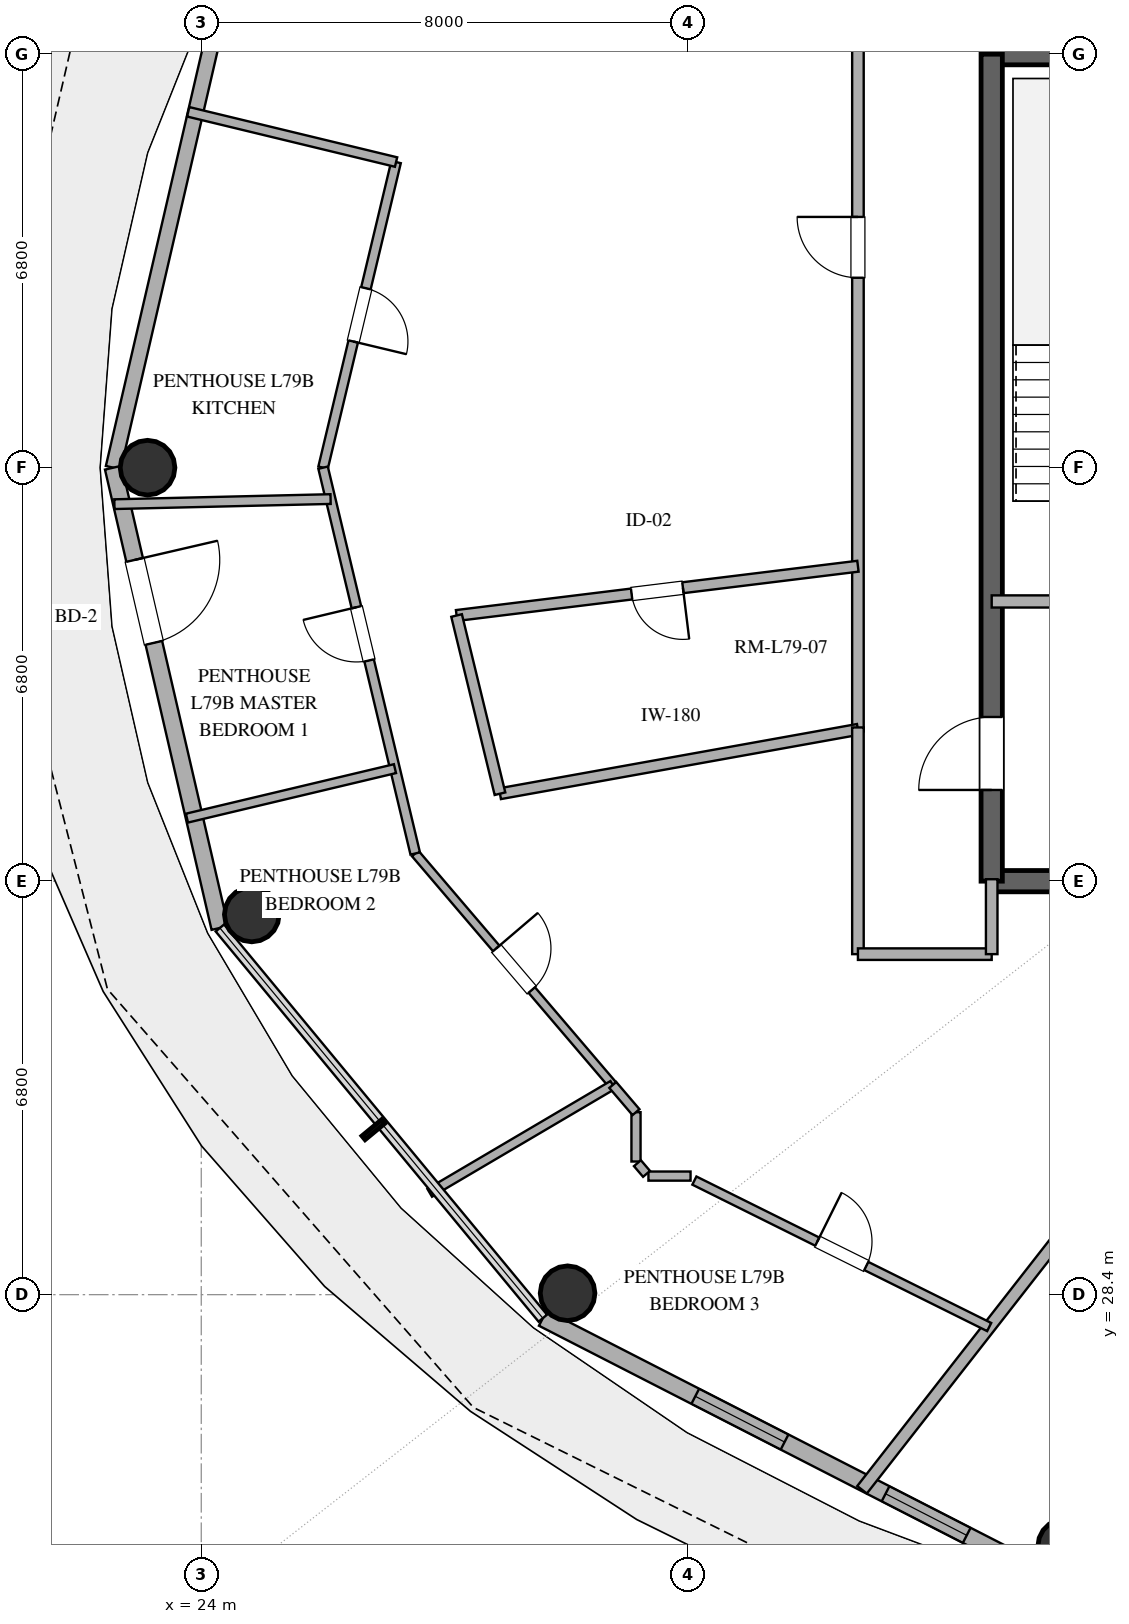
"""IFC4 building model, lengths in metres.
Left out: names, types, materials, properties, quantities, classifications, styles, units other than length and angle.
Written with IfcOpenShell. Run it as: python <this file> out.ifc"""

import sys

from ifc_helpers import new_model, si_unit, direction, frame, frame_2d, origin, origin_2d, place, context, subcontext, project, spatial, rectangle, hollow_circle, extrude, element, fill, save


model = new_model("IFC4")
c1 = context("Model", 3, precision=1e-05, world=origin(), true_north=direction((0.0, 1.0)))
c2 = subcontext(c1, "Body", "Model", "MODEL_VIEW")
j1 = project(units=[si_unit("LENGTHUNIT", "METRE"), si_unit("PLANEANGLEUNIT", "RADIAN")], contexts=[c1])
p1 = place(None, origin())
s1 = spatial("IfcSite", under=j1, at=p1, CompositionType="ELEMENT")
p2 = place(p1, origin())
s2 = spatial("IfcBuilding", under=s1, at=p2, CompositionType="ELEMENT")
p3 = place(p2, frame((0.0, 0.0, 305.4)))
s3 = spatial("IfcBuildingStorey", under=s2, at=p3, CompositionType="ELEMENT", Elevation=305.4)
for number, where, z_axis, x_axis in (
    (1, (37.0, 35.2, 0.0), (0.0, 0.0, 1.0), (1.0, 0.0, 0.0)),
    (2, (37.0, 48.8, 0.0), (0.0, 0.0, 1.0), (1.0, 0.0, 0.0)),
):
    element("IfcWall", number, at=place(p3, frame(where, z_axis=z_axis, x_axis=x_axis)), inside=s3, PredefinedType="SHEAR", context=c2, shape_type="SweptSolid", body=[
        extrude(rectangle(XDim=4.0, YDim=0.35, at=frame_2d((2.0, 0.0))), origin(), (0.0, 0.0, 1.0), 3.37),
    ])
p4 = place(p3, frame((37.0, 35.2, 0.0), z_axis=(0.0, 0.0, 1.0), x_axis=(0.0, 1.0, 0.0)))
e3 = element("IfcWall", 3, at=p4, inside=s3, PredefinedType="SHEAR", context=c2, shape_type="SweptSolid", body=[
    extrude(rectangle(XDim=13.6, YDim=0.35, at=frame_2d((6.8, 0.0))), origin(), (0.0, 0.0, 1.0), 3.37),
])
p5 = place(p4, frame((1.5, 0.0, 0.0)))
e4 = element("IfcOpeningElement", 4, at=p5, cuts=e3, PredefinedType="OPENING", context=c2, shape_type="SweptSolid", body=[
    extrude(rectangle(XDim=1.2, YDim=2.15, at=frame_2d((0.6, 1.075))), frame((0.0, 0.185, 0.0), z_axis=(0.0, -1.0, 0.0), x_axis=(1.0, 0.0, 0.0)), (0.0, 0.0, 1.0), 0.37),
])
for number, where, z_axis, x_axis in (
    (5, (23.117, 42.0, 0.0), (0.0, 0.0, 1.0), (1.0, 0.0, 0.0)),
    (6, (24.831, 34.653, 0.0), (0.0, 0.0, 1.0), (1.0, 0.0, 0.0)),
    (7, (30.025, 28.424, 0.0), (0.0, 0.0, 1.0), (1.0, 0.0, 0.0)),
    (8, (38.209, 24.261, 0.0), (0.0, 0.0, 1.0), (1.0, 0.0, 0.0)),
):
    element("IfcColumn", number, at=place(p3, frame(where, z_axis=z_axis, x_axis=x_axis)), inside=s3, PredefinedType="COLUMN", context=c2, shape_type="SweptSolid", body=[
        extrude(hollow_circle(Radius=0.45, WallThickness=0.025, at=origin_2d()), origin(), (0.0, 0.0, 1.0), 3.37),
    ])
p6 = place(p3, frame((24.306, 49.57, 0.0), z_axis=(0.0, 0.0, 1.0), x_axis=(-0.225635078214, -0.974211892495, 0.0)))
e9 = element("IfcWall", 9, at=p6, inside=s3, PredefinedType="SOLIDWALL", context=c2, shape_type="SweptSolid", body=[
    extrude(rectangle(XDim=7.77, YDim=0.25, at=frame_2d((3.885, 0.0))), origin(), (0.0, 0.0, 1.0), 3.37),
])
p7 = place(p3, frame((22.553, 42.0, 0.0), z_axis=(0.0, 0.0, 1.0), x_axis=(0.225635078214, -0.974211892495, 0.0)))
e10 = element("IfcWall", 10, at=p7, inside=s3, PredefinedType="SOLIDWALL", context=c2, shape_type="SweptSolid", body=[
    extrude(rectangle(XDim=7.77, YDim=0.28, at=frame_2d((3.885, 0.0))), origin(), (0.0, 0.0, 1.0), 3.37),
])
p8 = place(p7, frame((1.557, 0.0, 0.0)))
e11 = element("IfcOpeningElement", 11, at=p8, cuts=e10, PredefinedType="OPENING", context=c2, shape_type="SweptSolid", body=[
    extrude(rectangle(XDim=1.4, YDim=2.2, at=frame_2d((0.7, 1.1))), frame((0.0, 0.15, 0.0), z_axis=(0.0, -1.0, 0.0), x_axis=(1.0, 0.0, 0.0)), (0.0, 0.0, 1.0), 0.3),
])
p9 = place(p3, frame((29.617, 28.013, 0.0), z_axis=(0.0, 0.0, 1.0), x_axis=(0.890007394051, -0.455946091699, 0.0)))
e12 = element("IfcWall", 12, at=p9, inside=s3, PredefinedType="SOLIDWALL", context=c2, shape_type="SweptSolid", body=[
    extrude(rectangle(XDim=9.404, YDim=0.28, at=frame_2d((4.702, 0.0))), origin(), (0.0, 0.0, 1.0), 3.37),
])
p10 = place(p9, frame((2.817, 0.0, 0.85)))
e13 = element("IfcOpeningElement", 13, at=p10, cuts=e12, PredefinedType="OPENING", context=c2, shape_type="SweptSolid", body=[
    extrude(rectangle(XDim=1.65, YDim=2.0, at=frame_2d((0.825, 1.0))), frame((0.0, 0.15, 0.0), z_axis=(0.0, -1.0, 0.0), x_axis=(1.0, 0.0, 0.0)), (0.0, 0.0, 1.0), 0.3),
])
p11 = place(p9, frame((6.333, 0.0, 0.85)))
e14 = element("IfcOpeningElement", 14, at=p11, cuts=e12, PredefinedType="OPENING", context=c2, shape_type="SweptSolid", body=[
    extrude(rectangle(XDim=1.5, YDim=2.0, at=frame_2d((0.75, 1.0))), frame((0.0, 0.15, 0.0), z_axis=(0.0, -1.0, 0.0), x_axis=(1.0, 0.0, 0.0)), (0.0, 0.0, 1.0), 0.3),
])
p12 = place(p3, frame((37.0, 39.8, 0.0), z_axis=(0.0, 0.0, 1.0), x_axis=(1.0, 0.0, 0.0)))
e15 = element("IfcWall", 15, at=p12, inside=s3, PredefinedType="SOLIDWALL", context=c2, shape_type="SweptSolid", body=[
    extrude(rectangle(XDim=4.0, YDim=0.2, at=frame_2d((2.0, 0.0))), origin(), (0.0, 0.0, 1.0), 2.73),
])
p13 = place(p12, frame((1.45, 0.0, 0.0)))
e16 = element("IfcOpeningElement", 16, at=p13, cuts=e15, PredefinedType="OPENING", context=c2, shape_type="SweptSolid", body=[
    extrude(rectangle(XDim=1.1, YDim=2.15, at=frame_2d((0.55, 1.075))), frame((0.0, 0.11, 0.0), z_axis=(0.0, -1.0, 0.0), x_axis=(1.0, 0.0, 0.0)), (0.0, 0.0, 1.0), 0.22),
])
p14 = place(p3, frame((34.8, 37.663, 0.0), z_axis=(0.0, 0.0, 1.0), x_axis=(0.0, 1.0, 0.0)))
e17 = element("IfcWall", 17, at=p14, inside=s3, PredefinedType="PARTITIONING", context=c2, shape_type="SweptSolid", body=[
    extrude(rectangle(XDim=13.237, YDim=0.19, at=frame_2d((6.618, 0.0))), origin(), (0.0, 0.0, 1.0), 2.73),
])
p15 = place(p14, frame((7.46, 0.0, 0.0)))
e18 = element("IfcOpeningElement", 18, at=p15, cuts=e17, PredefinedType="OPENING", context=c2, shape_type="SweptSolid", body=[
    extrude(rectangle(XDim=1.0, YDim=2.2, at=frame_2d((0.5, 1.1))), frame((0.0, 0.105, 0.0), z_axis=(0.0, -1.0, 0.0), x_axis=(1.0, 0.0, 0.0)), (0.0, 0.0, 1.0), 0.21),
])
p16 = place(p3, frame((42.687, 35.2, 0.0), z_axis=(0.0, 0.0, 1.0), x_axis=(-0.615663811723, -0.788008928208, 0.0)))
e19 = element("IfcWall", 19, at=p16, inside=s3, PredefinedType="PARTITIONING", context=c2, shape_type="SweptSolid", body=[
    extrude(rectangle(XDim=12.701, YDim=0.2, at=frame_2d((6.351, 0.0))), origin(), (0.0, 0.0, 1.0), 2.73),
])
p17 = place(p3, frame((34.8, 40.379, 0.0), z_axis=(0.0, 0.0, 1.0), x_axis=(-0.99254493565, -0.121879246453, 0.0)))
e20 = element("IfcWall", 20, at=p17, inside=s3, PredefinedType="PLUMBINGWALL", context=c2, shape_type="SweptSolid", body=[
    extrude(rectangle(XDim=6.65, YDim=0.18, at=frame_2d((3.325, 0.0))), origin(), (0.0, 0.0, 1.0), 2.73),
])
p18 = place(p17, frame((2.9, 0.0, 0.0)))
e21 = element("IfcOpeningElement", 21, at=p18, cuts=e20, PredefinedType="OPENING", context=c2, shape_type="SweptSolid", body=[
    extrude(rectangle(XDim=0.85, YDim=2.1, at=frame_2d((0.425, 1.05))), frame((0.0, 0.1, 0.0), z_axis=(0.0, -1.0, 0.0), x_axis=(1.0, 0.0, 0.0)), (0.0, 0.0, 1.0), 0.2),
])
p19 = place(p3, frame((28.913, 36.638, 0.0), z_axis=(0.0, 0.0, 1.0), x_axis=(0.984251000252, 0.176776606208, 0.0)))
e22 = element("IfcWall", 22, at=p19, inside=s3, PredefinedType="PLUMBINGWALL", context=c2, shape_type="SweptSolid", body=[
    extrude(rectangle(XDim=5.981, YDim=0.18, at=frame_2d((2.991, 0.0))), origin(), (0.0, 0.0, 1.0), 2.73),
])
p20 = place(p3, frame((32.11, 30.276, 0.0), z_axis=(0.0, 0.0, 1.0), x_axis=(0.895587674753, -0.444885060247, 0.0)))
e23 = element("IfcWall", 23, at=p20, inside=s3, PredefinedType="PARTITIONING", context=c2, shape_type="SweptSolid", body=[
    extrude(rectangle(XDim=5.414, YDim=0.15, at=frame_2d((2.707, 0.0))), origin(), (0.0, 0.0, 1.0), 2.73),
])
p21 = place(p20, frame((2.257, 0.0, 0.0)))
e24 = element("IfcOpeningElement", 24, at=p21, cuts=e23, PredefinedType="OPENING", context=c2, shape_type="SweptSolid", body=[
    extrude(rectangle(XDim=0.9, YDim=2.1, at=frame_2d((0.45, 1.05))), frame((0.0, 0.085, 0.0), z_axis=(0.0, -1.0, 0.0), x_axis=(1.0, 0.0, 0.0)), (0.0, 0.0, 1.0), 0.17),
])
p22 = place(p3, frame((27.204, 47.026, 0.0), z_axis=(0.0, 0.0, 1.0), x_axis=(-0.232306036208, -0.972642743016, 0.0)))
e25 = element("IfcWall", 25, at=p22, inside=s3, PredefinedType="PLUMBINGWALL", context=c2, shape_type="SweptSolid", body=[
    extrude(rectangle(XDim=5.167, YDim=0.16, at=frame_2d((2.584, 0.0))), origin(), (0.0, 0.0, 1.0), 2.73),
])
p23 = place(p22, frame((2.134, 0.0, 0.0)))
e26 = element("IfcOpeningElement", 26, at=p23, cuts=e25, PredefinedType="OPENING", context=c2, shape_type="SweptSolid", body=[
    extrude(rectangle(XDim=0.9, YDim=2.1, at=frame_2d((0.45, 1.05))), frame((0.0, 0.09, 0.0), z_axis=(0.0, -1.0, 0.0), x_axis=(1.0, 0.0, 0.0)), (0.0, 0.0, 1.0), 0.18),
])
p24 = place(p3, frame((27.519, 35.655, 0.0), z_axis=(0.0, 0.0, 1.0), x_axis=(0.649223146716, -0.760597992219, 0.0)))
e27 = element("IfcWall", 27, at=p24, inside=s3, PredefinedType="PARTITIONING", context=c2, shape_type="SweptSolid", body=[
    extrude(rectangle(XDim=5.004, YDim=0.14, at=frame_2d((2.502, 0.0))), origin(), (0.0, 0.0, 1.0), 2.73),
])
p25 = place(p24, frame((2.052, 0.0, 0.0)))
e28 = element("IfcOpeningElement", 28, at=p25, cuts=e27, PredefinedType="OPENING", context=c2, shape_type="SweptSolid", body=[
    extrude(rectangle(XDim=0.9, YDim=2.1, at=frame_2d((0.45, 1.05))), frame((0.0, 0.08, 0.0), z_axis=(0.0, -1.0, 0.0), x_axis=(1.0, 0.0, 0.0)), (0.0, 0.0, 1.0), 0.16),
])
p26 = place(p3, frame((27.519, 35.655, 0.0), z_axis=(0.0, 0.0, 1.0), x_axis=(-0.232298462197, 0.972644551962, 0.0)))
e29 = element("IfcWall", 29, at=p26, inside=s3, PredefinedType="PLUMBINGWALL", context=c2, shape_type="SweptSolid", body=[
    extrude(rectangle(XDim=6.523, YDim=0.16, at=frame_2d((3.262, 0.0))), origin(), (0.0, 0.0, 1.0), 2.73),
])
p27 = place(p26, frame((3.264, 0.0, 0.0)))
e30 = element("IfcOpeningElement", 30, at=p27, cuts=e29, PredefinedType="OPENING", context=c2, shape_type="SweptSolid", body=[
    extrude(rectangle(XDim=0.9, YDim=2.1, at=frame_2d((0.45, 1.05))), frame((0.0, 0.09, 0.0), z_axis=(0.0, -1.0, 0.0), x_axis=(1.0, 0.0, 0.0)), (0.0, 0.0, 1.0), 0.18),
])
p28 = place(p3, frame((34.8, 34.0, 0.0), z_axis=(0.0, 0.0, 1.0), x_axis=(0.0, 1.0, 0.0)))
e31 = element("IfcWall", 31, at=p28, inside=s3, PredefinedType="PARTITIONING", context=c2, shape_type="SweptSolid", body=[
    extrude(rectangle(XDim=3.728, YDim=0.19, at=frame_2d((1.864, 0.0))), origin(), (0.0, 0.0, 1.0), 2.73),
])
p29 = place(p3, frame((26.127, 41.484, 0.0), z_axis=(0.0, 0.0, 1.0), x_axis=(-0.999722785281, -0.023544693446, 0.0)))
e32 = element("IfcWall", 32, at=p29, inside=s3, PredefinedType="PLUMBINGWALL", context=c2, shape_type="SweptSolid", body=[
    extrude(rectangle(XDim=3.557, YDim=0.16, at=frame_2d((1.778, 0.0))), origin(), (0.0, 0.0, 1.0), 2.73),
])
p30 = place(p3, frame((23.785, 47.852, 0.0), z_axis=(0.0, 0.0, 1.0), x_axis=(0.972019388221, -0.234900636274, 0.0)))
e33 = element("IfcWall", 33, at=p30, inside=s3, PredefinedType="PLUMBINGWALL", context=c2, shape_type="SweptSolid", body=[
    extrude(rectangle(XDim=3.517, YDim=0.16, at=frame_2d((1.759, 0.0))), origin(), (0.0, 0.0, 1.0), 2.73),
])
p31 = place(p3, frame((23.765, 36.237, 0.0), z_axis=(0.0, 0.0, 1.0), x_axis=(0.972875448823, 0.231329550808, 0.0)))
e34 = element("IfcWall", 34, at=p31, inside=s3, PredefinedType="PARTITIONING", context=c2, shape_type="SweptSolid", body=[
    extrude(rectangle(XDim=3.517, YDim=0.15, at=frame_2d((1.758, 0.0))), origin(), (0.0, 0.0, 1.0), 2.73),
])
p32 = place(p3, frame((30.768, 31.849, 0.0), z_axis=(0.0, 0.0, 1.0), x_axis=(-0.861632311911, -0.50753301279, 0.0)))
e35 = element("IfcWall", 35, at=p32, inside=s3, PredefinedType="PARTITIONING", context=c2, shape_type="SweptSolid", body=[
    extrude(rectangle(XDim=3.494, YDim=0.15, at=frame_2d((1.747, 0.0))), origin(), (0.0, 0.0, 1.0), 2.73),
])
p33 = place(p3, frame((28.199, 39.569, 0.0), z_axis=(0.0, 0.0, 1.0), x_axis=(0.236607697995, -0.971605268229, 0.0)))
e36 = element("IfcWall", 36, at=p33, inside=s3, PredefinedType="PLUMBINGWALL", context=c2, shape_type="SweptSolid", body=[
    extrude(rectangle(XDim=3.016, YDim=0.18, at=frame_2d((1.508, 0.0))), origin(), (0.0, 0.0, 1.0), 2.73),
])
p34 = place(p3, frame((37.0, 34.0, 0.0), z_axis=(0.0, 0.0, 1.0), x_axis=(-1.0, 0.0, 0.0)))
e37 = element("IfcWall", 37, at=p34, inside=s3, PredefinedType="PARTITIONING", context=c2, shape_type="SweptSolid", body=[
    extrude(rectangle(XDim=2.2, YDim=0.19, at=frame_2d((1.1, 0.0))), origin(), (0.0, 0.0, 1.0), 2.73),
])
p35 = place(p3, frame((37.0, 35.232, 0.0), z_axis=(0.0, 0.0, 1.0), x_axis=(0.0, -1.0, 0.0)))
e38 = element("IfcWall", 38, at=p35, inside=s3, PredefinedType="PARTITIONING", context=c2, shape_type="SweptSolid", body=[
    extrude(rectangle(XDim=1.232, YDim=0.19, at=frame_2d((0.616, 0.0))), origin(), (0.0, 0.0, 1.0), 2.73),
])
p36 = place(p3, frame((31.15, 31.401, 0.0), z_axis=(0.0, 0.0, 1.0), x_axis=(0.0, -1.0, 0.0)))
e39 = element("IfcWall", 39, at=p36, inside=s3, PredefinedType="PARTITIONING", context=c2, shape_type="SweptSolid", body=[
    extrude(rectangle(XDim=0.812, YDim=0.15, at=frame_2d((0.406, 0.0))), origin(), (0.0, 0.0, 1.0), 2.73),
])
p37 = place(p3, frame((31.354, 30.35, 0.0), z_axis=(0.0, 0.0, 1.0), x_axis=(1.0, 0.0, 0.0)))
e40 = element("IfcWall", 40, at=p37, inside=s3, PredefinedType="PARTITIONING", context=c2, shape_type="SweptSolid", body=[
    extrude(rectangle(XDim=0.693, YDim=0.15, at=frame_2d((0.346, 0.0))), origin(), (0.0, 0.0, 1.0), 2.73),
])
p38 = place(p3, frame((30.768, 31.849, 0.0), z_axis=(0.0, 0.0, 1.0), x_axis=(0.649080846661, -0.760719432181, 0.0)))
e41 = element("IfcWall", 41, at=p38, inside=s3, PredefinedType="PARTITIONING", context=c2, shape_type="SweptSolid", body=[
    extrude(rectangle(XDim=0.588, YDim=0.15, at=frame_2d((0.294, 0.0))), origin(), (0.0, 0.0, 1.0), 2.73),
])
p39 = place(p3, frame((31.173, 30.562, 0.0), z_axis=(0.0, 0.0, 1.0), x_axis=(0.648874632887, -0.760895334981, 0.0)))
e42 = element("IfcWall", 42, at=p39, inside=s3, PredefinedType="PARTITIONING", context=c2, shape_type="SweptSolid", body=[
    extrude(rectangle(XDim=0.231, YDim=0.15, at=frame_2d((0.115, 0.0))), origin(), (0.0, 0.0, 1.0), 2.73),
])
p40 = place(p8, origin())
e43 = element("IfcDoor", 43, at=p40, inside=s3, OperationType="SINGLE_SWING_LEFT", PredefinedType="DOOR", context=c2, shape_type="SweptSolid", body=[
    extrude(rectangle(XDim=1.4, YDim=2.2, at=frame_2d((0.7, 1.1))), frame((0.0, 0.025, 0.0), z_axis=(0.0, -1.0, 0.0), x_axis=(1.0, 0.0, 0.0)), (0.0, 0.0, 1.0), 0.05),
])
fill(e11, e43)
p41 = place(p10, origin())
e44 = element("IfcWindow", 44, at=p41, inside=s3, PartitioningType="SINGLE_PANEL", PredefinedType="WINDOW", context=c2, shape_type="SweptSolid", body=[
    extrude(rectangle(XDim=1.65, YDim=2.0, at=frame_2d((0.825, 1.0))), frame((0.0, 0.03, 0.0), z_axis=(0.0, -1.0, 0.0), x_axis=(1.0, 0.0, 0.0)), (0.0, 0.0, 1.0), 0.06),
])
fill(e13, e44)
p42 = place(p11, origin())
e45 = element("IfcWindow", 45, at=p42, inside=s3, PartitioningType="SINGLE_PANEL", PredefinedType="WINDOW", context=c2, shape_type="SweptSolid", body=[
    extrude(rectangle(XDim=1.5, YDim=2.0, at=frame_2d((0.75, 1.0))), frame((0.0, 0.03, 0.0), z_axis=(0.0, -1.0, 0.0), x_axis=(1.0, 0.0, 0.0)), (0.0, 0.0, 1.0), 0.06),
])
fill(e14, e45)
p43 = place(p5, origin())
e46 = element("IfcDoor", 46, at=p43, inside=s3, OperationType="SINGLE_SWING_LEFT", PredefinedType="DOOR", context=c2, shape_type="SweptSolid", body=[
    extrude(rectangle(XDim=1.2, YDim=2.15, at=frame_2d((0.6, 1.075))), frame((0.0, 0.025, 0.0), z_axis=(0.0, -1.0, 0.0), x_axis=(1.0, 0.0, 0.0)), (0.0, 0.0, 1.0), 0.05),
])
fill(e4, e46)
p44 = place(p15, origin())
e47 = element("IfcDoor", 47, at=p44, inside=s3, OperationType="SINGLE_SWING_RIGHT", PredefinedType="DOOR", context=c2, shape_type="SweptSolid", body=[
    extrude(rectangle(XDim=1.0, YDim=2.2, at=frame_2d((0.5, 1.1))), frame((0.0, 0.025, 0.0), z_axis=(0.0, -1.0, 0.0), x_axis=(1.0, 0.0, 0.0)), (0.0, 0.0, 1.0), 0.05),
])
fill(e18, e47)
p45 = place(p18, origin())
e48 = element("IfcDoor", 48, at=p45, inside=s3, OperationType="SINGLE_SWING_LEFT", PredefinedType="DOOR", context=c2, shape_type="SweptSolid", body=[
    extrude(rectangle(XDim=0.85, YDim=2.1, at=frame_2d((0.425, 1.05))), frame((0.0, 0.025, 0.0), z_axis=(0.0, -1.0, 0.0), x_axis=(1.0, 0.0, 0.0)), (0.0, 0.0, 1.0), 0.05),
])
fill(e21, e48)
p46 = place(p21, origin())
e49 = element("IfcDoor", 49, at=p46, inside=s3, OperationType="SINGLE_SWING_LEFT", PredefinedType="DOOR", context=c2, shape_type="SweptSolid", body=[
    extrude(rectangle(XDim=0.9, YDim=2.1, at=frame_2d((0.45, 1.05))), frame((0.0, 0.025, 0.0), z_axis=(0.0, -1.0, 0.0), x_axis=(1.0, 0.0, 0.0)), (0.0, 0.0, 1.0), 0.05),
])
fill(e24, e49)
p47 = place(p23, origin())
e50 = element("IfcDoor", 50, at=p47, inside=s3, OperationType="SINGLE_SWING_RIGHT", PredefinedType="DOOR", context=c2, shape_type="SweptSolid", body=[
    extrude(rectangle(XDim=0.9, YDim=2.1, at=frame_2d((0.45, 1.05))), frame((0.0, 0.025, 0.0), z_axis=(0.0, -1.0, 0.0), x_axis=(1.0, 0.0, 0.0)), (0.0, 0.0, 1.0), 0.05),
])
fill(e26, e50)
p48 = place(p25, origin())
e51 = element("IfcDoor", 51, at=p48, inside=s3, OperationType="SINGLE_SWING_LEFT", PredefinedType="DOOR", context=c2, shape_type="SweptSolid", body=[
    extrude(rectangle(XDim=0.9, YDim=2.1, at=frame_2d((0.45, 1.05))), frame((0.0, 0.025, 0.0), z_axis=(0.0, -1.0, 0.0), x_axis=(1.0, 0.0, 0.0)), (0.0, 0.0, 1.0), 0.05),
])
fill(e28, e51)
p49 = place(p27, origin())
e52 = element("IfcDoor", 52, at=p49, inside=s3, OperationType="SINGLE_SWING_RIGHT", PredefinedType="DOOR", context=c2, shape_type="SweptSolid", body=[
    extrude(rectangle(XDim=0.9, YDim=2.1, at=frame_2d((0.45, 1.05))), frame((0.0, 0.025, 0.0), z_axis=(0.0, -1.0, 0.0), x_axis=(1.0, 0.0, 0.0)), (0.0, 0.0, 1.0), 0.05),
])
fill(e30, e52)
save(model, sys.argv[1])
